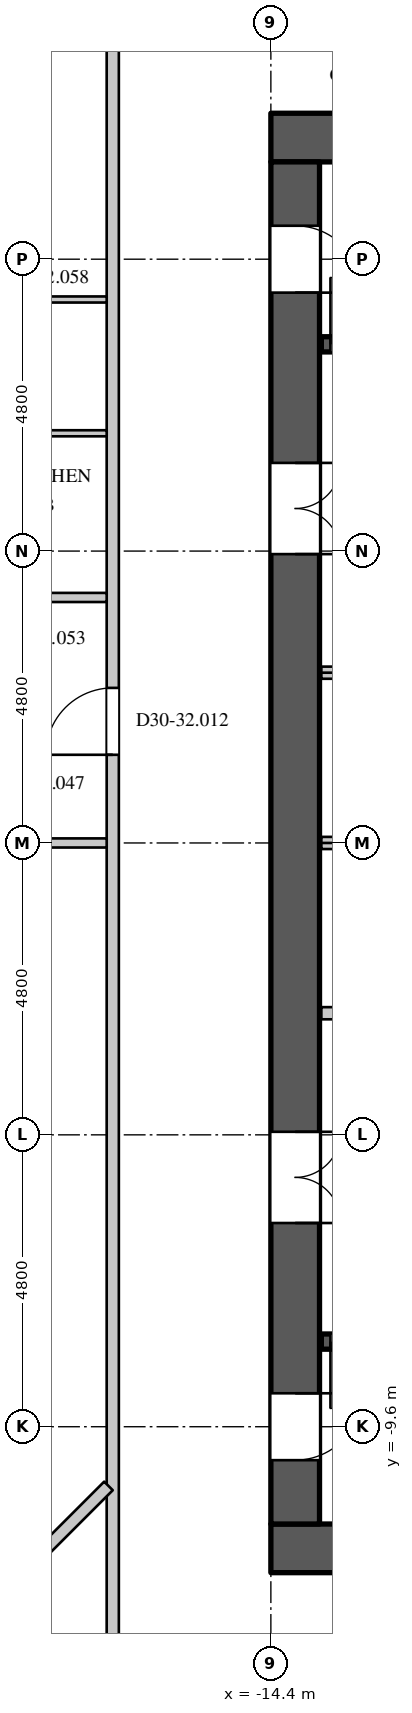
"""IFC4 building model, lengths in metres.
Left out: names, types, materials, properties, quantities, classifications, styles, units other than length and angle.
Written with IfcOpenShell. Run it as: python <this file> out.ifc"""

import sys

from ifc_helpers import new_model, si_unit, direction, frame, frame_2d, origin, place, context, subcontext, project, spatial, rectangle, extrude, element, fill, save


model = new_model("IFC4")
c1 = context("Model", 3, precision=1e-05, world=origin(), true_north=direction((0.0, 1.0)))
c2 = subcontext(c1, "Body", "Model", "MODEL_VIEW")
j1 = project(units=[si_unit("LENGTHUNIT", "METRE"), si_unit("PLANEANGLEUNIT", "RADIAN")], contexts=[c1])
p1 = place(None, origin())
s1 = spatial("IfcSite", under=j1, at=p1, CompositionType="ELEMENT")
p2 = place(p1, origin())
s2 = spatial("IfcBuilding", under=s1, at=p2, CompositionType="ELEMENT")
p3 = place(p2, frame((0.0, 0.0, 131.7)))
s3 = spatial("IfcBuildingStorey", under=s2, at=p3, CompositionType="ELEMENT", Elevation=131.7)
for number, where, z_axis, x_axis in (
    (1, (-14.4, 11.6, 0.0), (0.0, 0.0, 1.0), (1.0, 0.0, 0.0)),
    (2, (-14.4, -11.6, 0.0), (0.0, 0.0, 1.0), (1.0, 0.0, 0.0)),
):
    element("IfcWall", number, at=place(p3, frame(where, z_axis=z_axis, x_axis=x_axis)), inside=s3, PredefinedType="SHEAR", context=c2, shape_type="SweptSolid", body=[
        extrude(rectangle(XDim=28.8, YDim=0.8, at=frame_2d((14.4, 0.0))), origin(), (0.0, 0.0, 1.0), 4.2),
    ])
p4 = place(p3, frame((-14.0, -11.2, 0.0), z_axis=(0.0, 0.0, 1.0), x_axis=(0.0, 1.0, 0.0)))
e3 = element("IfcWall", 3, at=p4, inside=s3, PredefinedType="SHEAR", context=c2, shape_type="SweptSolid", body=[
    extrude(rectangle(XDim=22.4, YDim=0.8, at=frame_2d((11.2, 0.0))), origin(), (0.0, 0.0, 1.0), 4.2),
])
p5 = place(p4, frame((20.25, 0.0, 0.0)))
e4 = element("IfcOpeningElement", 4, at=p5, cuts=e3, PredefinedType="OPENING", context=c2, shape_type="SweptSolid", body=[
    extrude(rectangle(XDim=1.1, YDim=2.2, at=frame_2d((0.55, 1.1))), frame((0.0, 0.41, 0.0), z_axis=(0.0, -1.0, 0.0), x_axis=(1.0, 0.0, 0.0)), (0.0, 0.0, 1.0), 0.82),
])
p6 = place(p4, frame((1.05, 0.0, 0.0)))
e5 = element("IfcOpeningElement", 5, at=p6, cuts=e3, PredefinedType="OPENING", context=c2, shape_type="SweptSolid", body=[
    extrude(rectangle(XDim=1.1, YDim=2.2, at=frame_2d((0.55, 1.1))), frame((0.0, 0.41, 0.0), z_axis=(0.0, -1.0, 0.0), x_axis=(1.0, 0.0, 0.0)), (0.0, 0.0, 1.0), 0.82),
])
p7 = place(p4, frame((15.95, 0.0, 0.0)))
e6 = element("IfcOpeningElement", 6, at=p7, cuts=e3, PredefinedType="OPENING", context=c2, shape_type="SweptSolid", body=[
    extrude(rectangle(XDim=1.5, YDim=2.4, at=frame_2d((0.75, 1.2))), frame((0.0, 0.41, 0.0), z_axis=(0.0, -1.0, 0.0), x_axis=(1.0, 0.0, 0.0)), (0.0, 0.0, 1.0), 0.82),
])
p8 = place(p4, frame((4.95, 0.0, 0.0)))
e7 = element("IfcOpeningElement", 7, at=p8, cuts=e3, PredefinedType="OPENING", context=c2, shape_type="SweptSolid", body=[
    extrude(rectangle(XDim=1.5, YDim=2.4, at=frame_2d((0.75, 1.2))), frame((0.0, 0.41, 0.0), z_axis=(0.0, -1.0, 0.0), x_axis=(1.0, 0.0, 0.0)), (0.0, 0.0, 1.0), 0.82),
])
p9 = place(p3, frame((-17.0, -14.5, 0.0), z_axis=(0.0, 0.0, 1.0), x_axis=(0.0, 1.0, 0.0)))
e8 = element("IfcWall", 8, at=p9, inside=s3, PredefinedType="PARTITIONING", context=c2, shape_type="SweptSolid", body=[
    extrude(rectangle(XDim=29.0, YDim=0.2, at=frame_2d((14.5, 0.0))), origin(), (0.0, 0.0, 1.0), 3.95),
])
p10 = place(p9, frame((15.95, 0.0, 0.0)))
e9 = element("IfcOpeningElement", 9, at=p10, cuts=e8, PredefinedType="OPENING", context=c2, shape_type="SweptSolid", body=[
    extrude(rectangle(XDim=1.1, YDim=2.4, at=frame_2d((0.55, 1.2))), frame((0.0, 0.11, 0.0), z_axis=(0.0, -1.0, 0.0), x_axis=(1.0, 0.0, 0.0)), (0.0, 0.0, 1.0), 0.22),
])
p11 = place(p3, frame((-21.947, 11.636, 0.0), z_axis=(0.0, 0.0, 1.0), x_axis=(0.707106781187, 0.707106781187, 0.0)))
e10 = element("IfcWall", 10, at=p11, inside=s3, PredefinedType="PARTITIONING", context=c2, shape_type="SweptSolid", body=[
    extrude(rectangle(XDim=11.885, YDim=0.15, at=frame_2d((5.942, 0.0))), origin(), (0.0, 0.0, 1.0), 3.95),
])
p12 = place(p11, frame((9.1, 0.0, 0.0)))
e11 = element("IfcOpeningElement", 11, at=p12, cuts=e10, PredefinedType="OPENING", context=c2, shape_type="SweptSolid", body=[
    extrude(rectangle(XDim=0.95, YDim=2.2, at=frame_2d((0.475, 1.1))), frame((0.0, 0.085, 0.0), z_axis=(0.0, -1.0, 0.0), x_axis=(1.0, 0.0, 0.0)), (0.0, 0.0, 1.0), 0.17),
])
p13 = place(p11, frame((3.1, 0.0, 0.0)))
e12 = element("IfcOpeningElement", 12, at=p13, cuts=e10, PredefinedType="OPENING", context=c2, shape_type="SweptSolid", body=[
    extrude(rectangle(XDim=0.95, YDim=2.2, at=frame_2d((0.475, 1.1))), frame((0.0, 0.085, 0.0), z_axis=(0.0, -1.0, 0.0), x_axis=(1.0, 0.0, 0.0)), (0.0, 0.0, 1.0), 0.17),
])
p14 = place(p3, frame((-20.925, 4.037, 0.0), z_axis=(0.0, 0.0, 1.0), x_axis=(1.0, 0.0, 0.0)))
e13 = element("IfcWall", 13, at=p14, inside=s3, PredefinedType="PARTITIONING", context=c2, shape_type="SweptSolid", body=[
    extrude(rectangle(XDim=3.825, YDim=0.15, at=frame_2d((1.913, 0.0))), origin(), (0.0, 0.0, 1.0), 3.95),
])
p15 = place(p14, frame((1.05, 0.0, 0.0)))
e14 = element("IfcOpeningElement", 14, at=p15, cuts=e13, PredefinedType="OPENING", context=c2, shape_type="SweptSolid", body=[
    extrude(rectangle(XDim=0.95, YDim=2.2, at=frame_2d((0.475, 1.1))), frame((0.0, 0.085, 0.0), z_axis=(0.0, -1.0, 0.0), x_axis=(1.0, 0.0, 0.0)), (0.0, 0.0, 1.0), 0.17),
])
p16 = place(p3, frame((-20.02, 0.0, 0.0), z_axis=(0.0, 0.0, 1.0), x_axis=(1.0, 0.0, 0.0)))
e15 = element("IfcWall", 15, at=p16, inside=s3, PredefinedType="PARTITIONING", context=c2, shape_type="SweptSolid", body=[
    extrude(rectangle(XDim=2.92, YDim=0.15, at=frame_2d((1.46, 0.0))), origin(), (0.0, 0.0, 1.0), 3.95),
])
p17 = place(p16, frame((0.35, 0.0, 0.0)))
e16 = element("IfcOpeningElement", 16, at=p17, cuts=e15, PredefinedType="OPENING", context=c2, shape_type="SweptSolid", body=[
    extrude(rectangle(XDim=0.95, YDim=2.2, at=frame_2d((0.475, 1.1))), frame((0.0, 0.085, 0.0), z_axis=(0.0, -1.0, 0.0), x_axis=(1.0, 0.0, 0.0)), (0.0, 0.0, 1.0), 0.17),
])
p18 = place(p3, frame((-23.19, -16.693, 0.0), z_axis=(0.0, 0.0, 1.0), x_axis=(0.707106781187, 0.707106781187, 0.0)))
e17 = element("IfcWall", 17, at=p18, inside=s3, PredefinedType="PARTITIONING", context=c2, shape_type="SweptSolid", body=[
    extrude(rectangle(XDim=8.655, YDim=0.2, at=frame_2d((4.327, 0.0))), origin(), (0.0, 0.0, 1.0), 3.95),
])
p19 = place(p3, frame((-13.57, -2.8, 0.0), z_axis=(0.0, 0.0, 1.0), x_axis=(1.0, 0.0, 0.0)))
e18 = element("IfcWall", 18, at=p19, inside=s3, PredefinedType="PARTITIONING", context=c2, shape_type="SweptSolid", body=[
    extrude(rectangle(XDim=3.19, YDim=0.2, at=frame_2d((1.595, 0.0))), origin(), (0.0, 0.0, 1.0), 3.95),
])
p20 = place(p19, frame((1.25, 0.0, 0.0)))
e19 = element("IfcOpeningElement", 19, at=p20, cuts=e18, PredefinedType="OPENING", context=c2, shape_type="SweptSolid", body=[
    extrude(rectangle(XDim=0.6, YDim=2.0, at=frame_2d((0.3, 1.0))), frame((0.0, 0.11, 0.0), z_axis=(0.0, -1.0, 0.0), x_axis=(1.0, 0.0, 0.0)), (0.0, 0.0, 1.0), 0.22),
])
p21 = place(p3, frame((-13.57, 0.0, 0.0), z_axis=(0.0, 0.0, 1.0), x_axis=(1.0, 0.0, 0.0)))
e20 = element("IfcWall", 20, at=p21, inside=s3, PredefinedType="PARTITIONING", context=c2, shape_type="SweptSolid", body=[
    extrude(rectangle(XDim=23.97, YDim=0.2, at=frame_2d((11.985, 0.0))), origin(), (0.0, 0.0, 1.0), 3.95),
])
p22 = place(p3, frame((-13.57, 2.8, 0.0), z_axis=(0.0, 0.0, 1.0), x_axis=(1.0, 0.0, 0.0)))
e21 = element("IfcWall", 21, at=p22, inside=s3, PredefinedType="PARTITIONING", context=c2, shape_type="SweptSolid", body=[
    extrude(rectangle(XDim=23.97, YDim=0.2, at=frame_2d((11.985, 0.0))), origin(), (0.0, 0.0, 1.0), 3.95),
])
p23 = place(p22, frame((1.0, 0.0, 0.0)))
e22 = element("IfcOpeningElement", 22, at=p23, cuts=e21, PredefinedType="OPENING", context=c2, shape_type="SweptSolid", body=[
    extrude(rectangle(XDim=1.1, YDim=2.2, at=frame_2d((0.55, 1.1))), frame((0.0, 0.11, 0.0), z_axis=(0.0, -1.0, 0.0), x_axis=(1.0, 0.0, 0.0)), (0.0, 0.0, 1.0), 0.22),
])
p24 = place(p22, frame((3.9, 0.0, 0.0)))
e23 = element("IfcOpeningElement", 23, at=p24, cuts=e21, PredefinedType="OPENING", context=c2, shape_type="SweptSolid", body=[
    extrude(rectangle(XDim=1.1, YDim=2.2, at=frame_2d((0.55, 1.1))), frame((0.0, 0.11, 0.0), z_axis=(0.0, -1.0, 0.0), x_axis=(1.0, 0.0, 0.0)), (0.0, 0.0, 1.0), 0.22),
])
p25 = place(p22, frame((6.5, 0.0, 0.0)))
e24 = element("IfcOpeningElement", 24, at=p25, cuts=e21, PredefinedType="OPENING", context=c2, shape_type="SweptSolid", body=[
    extrude(rectangle(XDim=1.1, YDim=2.2, at=frame_2d((0.55, 1.1))), frame((0.0, 0.11, 0.0), z_axis=(0.0, -1.0, 0.0), x_axis=(1.0, 0.0, 0.0)), (0.0, 0.0, 1.0), 0.22),
])
p26 = place(p22, frame((9.1, 0.0, 0.0)))
e25 = element("IfcOpeningElement", 25, at=p26, cuts=e21, PredefinedType="OPENING", context=c2, shape_type="SweptSolid", body=[
    extrude(rectangle(XDim=1.1, YDim=2.2, at=frame_2d((0.55, 1.1))), frame((0.0, 0.11, 0.0), z_axis=(0.0, -1.0, 0.0), x_axis=(1.0, 0.0, 0.0)), (0.0, 0.0, 1.0), 0.22),
])
p27 = place(p22, frame((11.7, 0.0, 0.0)))
e26 = element("IfcOpeningElement", 26, at=p27, cuts=e21, PredefinedType="OPENING", context=c2, shape_type="SweptSolid", body=[
    extrude(rectangle(XDim=1.1, YDim=2.2, at=frame_2d((0.55, 1.1))), frame((0.0, 0.11, 0.0), z_axis=(0.0, -1.0, 0.0), x_axis=(1.0, 0.0, 0.0)), (0.0, 0.0, 1.0), 0.22),
])
p28 = place(p22, frame((14.3, 0.0, 0.0)))
e27 = element("IfcOpeningElement", 27, at=p28, cuts=e21, PredefinedType="OPENING", context=c2, shape_type="SweptSolid", body=[
    extrude(rectangle(XDim=1.1, YDim=2.2, at=frame_2d((0.55, 1.1))), frame((0.0, 0.11, 0.0), z_axis=(0.0, -1.0, 0.0), x_axis=(1.0, 0.0, 0.0)), (0.0, 0.0, 1.0), 0.22),
])
p29 = place(p22, frame((16.9, 0.0, 0.0)))
e28 = element("IfcOpeningElement", 28, at=p29, cuts=e21, PredefinedType="OPENING", context=c2, shape_type="SweptSolid", body=[
    extrude(rectangle(XDim=1.1, YDim=2.2, at=frame_2d((0.55, 1.1))), frame((0.0, 0.11, 0.0), z_axis=(0.0, -1.0, 0.0), x_axis=(1.0, 0.0, 0.0)), (0.0, 0.0, 1.0), 0.22),
])
p30 = place(p22, frame((19.5, 0.0, 0.0)))
e29 = element("IfcOpeningElement", 29, at=p30, cuts=e21, PredefinedType="OPENING", context=c2, shape_type="SweptSolid", body=[
    extrude(rectangle(XDim=1.1, YDim=2.2, at=frame_2d((0.55, 1.1))), frame((0.0, 0.11, 0.0), z_axis=(0.0, -1.0, 0.0), x_axis=(1.0, 0.0, 0.0)), (0.0, 0.0, 1.0), 0.22),
])
p31 = place(p3, frame((-13.57, -8.2, 0.0), z_axis=(0.0, 0.0, 1.0), x_axis=(1.0, 0.0, 0.0)))
e30 = element("IfcWall", 30, at=p31, inside=s3, PredefinedType="SHEAR", context=c2, shape_type="SweptSolid", body=[
    extrude(rectangle(XDim=8.295, YDim=0.25, at=frame_2d((4.147, 0.0))), origin(), (0.0, 0.0, 1.0), 3.95),
])
p32 = place(p31, frame((0.15, 0.0, 0.0)))
e31 = element("IfcOpeningElement", 31, at=p32, cuts=e30, PredefinedType="OPENING", context=c2, shape_type="SweptSolid", body=[
    extrude(rectangle(XDim=1.1, YDim=2.2, at=frame_2d((0.55, 1.1))), frame((0.0, 0.135, 0.0), z_axis=(0.0, -1.0, 0.0), x_axis=(1.0, 0.0, 0.0)), (0.0, 0.0, 1.0), 0.27),
])
p33 = place(p3, frame((-13.57, 8.2, 0.0), z_axis=(0.0, 0.0, 1.0), x_axis=(1.0, 0.0, 0.0)))
e32 = element("IfcWall", 32, at=p33, inside=s3, PredefinedType="SHEAR", context=c2, shape_type="SweptSolid", body=[
    extrude(rectangle(XDim=8.295, YDim=0.25, at=frame_2d((4.147, 0.0))), origin(), (0.0, 0.0, 1.0), 3.95),
])
p34 = place(p33, frame((0.15, 0.0, 0.0)))
e33 = element("IfcOpeningElement", 33, at=p34, cuts=e32, PredefinedType="OPENING", context=c2, shape_type="SweptSolid", body=[
    extrude(rectangle(XDim=1.1, YDim=2.2, at=frame_2d((0.55, 1.1))), frame((0.0, 0.135, 0.0), z_axis=(0.0, -1.0, 0.0), x_axis=(1.0, 0.0, 0.0)), (0.0, 0.0, 1.0), 0.27),
])
p35 = place(p3, frame((-20.98, 8.937, 0.0), z_axis=(0.0, 0.0, 1.0), x_axis=(1.0, 0.0, 0.0)))
e34 = element("IfcWall", 34, at=p35, inside=s3, PredefinedType="PARTITIONING", context=c2, shape_type="SweptSolid", body=[
    extrude(rectangle(XDim=3.88, YDim=0.1, at=frame_2d((1.94, 0.0))), origin(), (0.0, 0.0, 1.0), 3.95),
])
p36 = place(p35, frame((1.05, 0.0, 0.0)))
e35 = element("IfcOpeningElement", 35, at=p36, cuts=e34, PredefinedType="OPENING", context=c2, shape_type="SweptSolid", body=[
    extrude(rectangle(XDim=0.9, YDim=2.2, at=frame_2d((0.45, 1.1))), frame((0.0, 0.06, 0.0), z_axis=(0.0, -1.0, 0.0), x_axis=(1.0, 0.0, 0.0)), (0.0, 0.0, 1.0), 0.12),
])
p37 = place(p3, frame((-20.925, 6.737, 0.0), z_axis=(0.0, 0.0, 1.0), x_axis=(1.0, 0.0, 0.0)))
e36 = element("IfcWall", 36, at=p37, inside=s3, PredefinedType="PARTITIONING", context=c2, shape_type="SweptSolid", body=[
    extrude(rectangle(XDim=3.825, YDim=0.1, at=frame_2d((1.913, 0.0))), origin(), (0.0, 0.0, 1.0), 3.95),
])
p38 = place(p34, origin())
e37 = element("IfcDoor", 37, at=p38, inside=s3, OperationType="SINGLE_SWING_LEFT", PredefinedType="DOOR", context=c2, shape_type="SweptSolid", body=[
    extrude(rectangle(XDim=1.1, YDim=2.2, at=frame_2d((0.55, 1.1))), frame((0.0, 0.025, 0.0), z_axis=(0.0, -1.0, 0.0), x_axis=(1.0, 0.0, 0.0)), (0.0, 0.0, 1.0), 0.05),
])
fill(e33, e37)
p39 = place(p32, origin())
e38 = element("IfcDoor", 38, at=p39, inside=s3, OperationType="SINGLE_SWING_RIGHT", PredefinedType="DOOR", context=c2, shape_type="SweptSolid", body=[
    extrude(rectangle(XDim=1.1, YDim=2.2, at=frame_2d((0.55, 1.1))), frame((0.0, 0.025, 0.0), z_axis=(0.0, -1.0, 0.0), x_axis=(1.0, 0.0, 0.0)), (0.0, 0.0, 1.0), 0.05),
])
fill(e31, e38)
p40 = place(p5, origin())
e39 = element("IfcDoor", 39, at=p40, inside=s3, OperationType="SINGLE_SWING_RIGHT", PredefinedType="DOOR", context=c2, shape_type="SweptSolid", body=[
    extrude(rectangle(XDim=1.1, YDim=2.2, at=frame_2d((0.55, 1.1))), frame((0.0, -0.345, 0.0), z_axis=(0.0, -1.0, 0.0), x_axis=(1.0, 0.0, 0.0)), (0.0, 0.0, 1.0), 0.05),
])
fill(e4, e39)
p41 = place(p6, origin())
e40 = element("IfcDoor", 40, at=p41, inside=s3, OperationType="SINGLE_SWING_LEFT", PredefinedType="DOOR", context=c2, shape_type="SweptSolid", body=[
    extrude(rectangle(XDim=1.1, YDim=2.2, at=frame_2d((0.55, 1.1))), frame((0.0, -0.345, 0.0), z_axis=(0.0, -1.0, 0.0), x_axis=(1.0, 0.0, 0.0)), (0.0, 0.0, 1.0), 0.05),
])
fill(e5, e40)
p42 = place(p7, origin())
e41 = element("IfcDoor", 41, at=p42, inside=s3, OperationType="DOUBLE_DOOR_SINGLE_SWING", PredefinedType="DOOR", context=c2, shape_type="SweptSolid", body=[
    extrude(rectangle(XDim=1.5, YDim=2.4, at=frame_2d((0.75, 1.2))), frame((0.0, -0.345, 0.0), z_axis=(0.0, -1.0, 0.0), x_axis=(1.0, 0.0, 0.0)), (0.0, 0.0, 1.0), 0.05),
])
fill(e6, e41)
p43 = place(p8, origin())
e42 = element("IfcDoor", 42, at=p43, inside=s3, OperationType="DOUBLE_DOOR_SINGLE_SWING", PredefinedType="DOOR", context=c2, shape_type="SweptSolid", body=[
    extrude(rectangle(XDim=1.5, YDim=2.4, at=frame_2d((0.75, 1.2))), frame((0.0, -0.345, 0.0), z_axis=(0.0, -1.0, 0.0), x_axis=(1.0, 0.0, 0.0)), (0.0, 0.0, 1.0), 0.05),
])
fill(e7, e42)
p44 = place(p10, origin())
e43 = element("IfcDoor", 43, at=p44, inside=s3, OperationType="SINGLE_SWING_LEFT", PredefinedType="DOOR", context=c2, shape_type="SweptSolid", body=[
    extrude(rectangle(XDim=1.1, YDim=2.4, at=frame_2d((0.55, 1.2))), frame((0.0, 0.025, 0.0), z_axis=(0.0, -1.0, 0.0), x_axis=(1.0, 0.0, 0.0)), (0.0, 0.0, 1.0), 0.05),
])
fill(e9, e43)
save(model, sys.argv[1])
